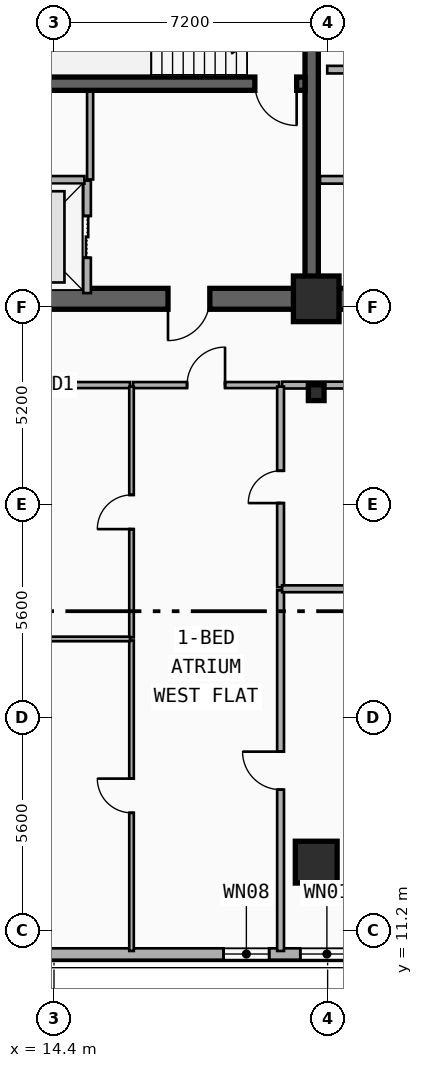
"""IFC4 building model, lengths in metres.
Left out: names, types, materials, properties, quantities, classifications, styles, units other than length and angle.
Written with IfcOpenShell. Run it as: python <this file> out.ifc"""

import sys

from ifc_helpers import new_model, si_unit, direction, frame, frame_2d, origin, origin_2d, place, context, subcontext, project, spatial, rectangle, i_section, extrude, element, fill, save


model = new_model("IFC4")
c1 = context("Model", 3, precision=1e-05, world=origin(), true_north=direction((0.0, 1.0)))
c2 = subcontext(c1, "Body", "Model", "MODEL_VIEW")
j1 = project(units=[si_unit("LENGTHUNIT", "METRE"), si_unit("PLANEANGLEUNIT", "RADIAN")], contexts=[c1])
p1 = place(None, origin())
s1 = spatial("IfcSite", under=j1, at=p1, CompositionType="ELEMENT")
p2 = place(p1, origin())
s2 = spatial("IfcBuilding", under=s1, at=p2, CompositionType="ELEMENT")
p3 = place(p2, frame((0.0, 0.0, 144.8)))
s3 = spatial("IfcBuildingStorey", under=s2, at=p3, CompositionType="ELEMENT", Elevation=144.8)
p4 = place(p3, frame((21.18, 27.82, 0.0), z_axis=(0.0, 0.0, 1.0), x_axis=(-1.0, 0.0, 0.0)))
e1 = element("IfcWall", 1, at=p4, inside=s3, PredefinedType="SHEAR", context=c2, shape_type="SweptSolid", body=[
    extrude(rectangle(XDim=9.03, YDim=0.55, at=frame_2d((4.515, 0.0))), origin(), (0.0, 0.0, 1.0), 3.55),
])
p5 = place(p4, frame((2.68, 0.0, 0.0)))
e2 = element("IfcOpeningElement", 2, at=p5, cuts=e1, PredefinedType="OPENING", context=c2, shape_type="SweptSolid", body=[
    extrude(rectangle(XDim=1.1, YDim=2.15, at=frame_2d((0.55, 1.075))), frame((0.0, 0.285, 0.0), z_axis=(0.0, -1.0, 0.0), x_axis=(1.0, 0.0, 0.0)), (0.0, 0.0, 1.0), 0.57),
])
p6 = place(p3, frame((33.15, 27.82, 0.0), z_axis=(0.0, 0.0, 1.0), x_axis=(-1.0, 0.0, 0.0)))
e3 = element("IfcWall", 3, at=p6, inside=s3, PredefinedType="SHEAR", context=c2, shape_type="SweptSolid", body=[
    extrude(rectangle(XDim=11.97, YDim=0.55, at=frame_2d((5.985, 0.0))), origin(), (0.0, 0.0, 1.0), 3.55),
])
p7 = place(p6, frame((6.1, 0.0, 0.0)))
e4 = element("IfcOpeningElement", 4, at=p7, cuts=e3, PredefinedType="OPENING", context=c2, shape_type="SweptSolid", body=[
    extrude(rectangle(XDim=1.6, YDim=2.2, at=frame_2d((0.8, 1.1))), frame((0.0, 0.285, 0.0), z_axis=(0.0, -1.0, 0.0), x_axis=(1.0, 0.0, 0.0)), (0.0, 0.0, 1.0), 0.57),
])
p8 = place(p3, frame((21.18, 28.095, 0.0), z_axis=(0.0, 0.0, 1.0), x_axis=(0.0, 1.0, 0.0)))
e5 = element("IfcWall", 5, at=p8, inside=s3, PredefinedType="SHEAR", context=c2, shape_type="SweptSolid", body=[
    extrude(rectangle(XDim=8.68, YDim=0.35, at=frame_2d((4.34, 0.0))), origin(), (0.0, 0.0, 1.0), 3.55),
])
p9 = place(p3, frame((21.005, 33.48, 0.0), z_axis=(0.0, 0.0, 1.0), x_axis=(-1.0, 0.0, 0.0)))
e6 = element("IfcWall", 6, at=p9, inside=s3, PredefinedType="SHEAR", context=c2, shape_type="SweptSolid", body=[
    extrude(rectangle(XDim=8.58, YDim=0.35, at=frame_2d((4.29, 0.0))), origin(), (0.0, 0.0, 1.0), 3.55),
])
p10 = place(p9, frame((0.22, 0.0, 0.0)))
e7 = element("IfcOpeningElement", 7, at=p10, cuts=e6, PredefinedType="OPENING", context=c2, shape_type="SweptSolid", body=[
    extrude(rectangle(XDim=1.1, YDim=2.15, at=frame_2d((0.55, 1.075))), frame((0.0, 0.185, 0.0), z_axis=(0.0, -1.0, 0.0), x_axis=(1.0, 0.0, 0.0)), (0.0, 0.0, 1.0), 0.37),
])
p11 = place(p3, frame((21.3, 27.82, 0.0), z_axis=(0.0, 0.0, 1.0), x_axis=(1.0, 0.0, 0.0)))
e8 = element("IfcColumn", 8, at=p11, inside=s3, PredefinedType="COLUMN", context=c2, shape_type="SweptSolid", body=[
    extrude(rectangle(XDim=1.2, YDim=1.2, at=origin_2d()), origin(), (0.0, 0.0, 1.0), 3.55),
])
p12 = place(p3, frame((21.3, 25.35, 0.0), z_axis=(0.0, 0.0, 1.0), x_axis=(1.0, 0.0, 0.0)))
e9 = element("IfcColumn", 9, at=p12, inside=s3, PredefinedType="COLUMN", context=c2, shape_type="SweptSolid", body=[
    extrude(i_section(OverallWidth=0.413, OverallDepth=0.415, WebThickness=0.03, FlangeThickness=0.047, FilletRadius=0.015, at=origin_2d()), origin(), (0.0, 0.0, 1.0), 3.55),
])
p13 = place(p3, frame((21.3, 13.106, 0.0), z_axis=(0.0, -0.0902702026, 0.995917311087), x_axis=(1.0, 0.0, 0.0)))
e10 = element("IfcColumn", 10, at=p13, inside=s3, PredefinedType="COLUMN", context=c2, shape_type="SweptSolid", body=[
    extrude(rectangle(XDim=1.1, YDim=1.1, at=origin_2d()), origin(), (0.0, 0.0, 1.0), 3.565),
])
p14 = place(p3, frame((48.0, 10.58, 0.0), z_axis=(0.0, 0.0, 1.0), x_axis=(-1.0, 0.0, 0.0)))
e11 = element("IfcWall", 11, at=p14, inside=s3, PredefinedType="SOLIDWALL", context=c2, shape_type="SweptSolid", body=[
    extrude(rectangle(XDim=38.4, YDim=0.3, at=frame_2d((19.2, 0.0))), origin(), (0.0, 0.0, 1.0), 3.29),
])
p15 = place(p14, frame((36.19, 0.0, 0.34)))
e12 = element("IfcOpeningElement", 12, at=p15, cuts=e11, PredefinedType="OPENING", context=c2, shape_type="SweptSolid", body=[
    extrude(rectangle(XDim=1.8, YDim=1.8, at=frame_2d((0.9, 0.9))), frame((0.0, 0.16, 0.0), z_axis=(0.0, -1.0, 0.0), x_axis=(1.0, 0.0, 0.0)), (0.0, 0.0, 1.0), 0.32),
])
p16 = place(p14, frame((27.938, 0.0, 0.34)))
e13 = element("IfcOpeningElement", 13, at=p16, cuts=e11, PredefinedType="OPENING", context=c2, shape_type="SweptSolid", body=[
    extrude(rectangle(XDim=1.2, YDim=1.5, at=frame_2d((0.6, 0.75))), frame((0.0, 0.16, 0.0), z_axis=(0.0, -1.0, 0.0), x_axis=(1.0, 0.0, 0.0)), (0.0, 0.0, 1.0), 0.32),
])
p17 = place(p14, frame((25.719, 0.0, 0.34)))
e14 = element("IfcOpeningElement", 14, at=p17, cuts=e11, PredefinedType="OPENING", context=c2, shape_type="SweptSolid", body=[
    extrude(rectangle(XDim=1.4, YDim=1.8, at=frame_2d((0.7, 0.9))), frame((0.0, 0.16, 0.0), z_axis=(0.0, -1.0, 0.0), x_axis=(1.0, 0.0, 0.0)), (0.0, 0.0, 1.0), 0.32),
])
p18 = place(p14, frame((33.861, 0.0, 1.22)))
e15 = element("IfcOpeningElement", 15, at=p18, cuts=e11, PredefinedType="OPENING", context=c2, shape_type="SweptSolid", body=[
    extrude(rectangle(XDim=1.2, YDim=1.5, at=frame_2d((0.6, 0.75))), frame((0.0, 0.16, 0.0), z_axis=(0.0, -1.0, 0.0), x_axis=(1.0, 0.0, 0.0)), (0.0, 0.0, 1.0), 0.32),
])
p19 = place(p14, frame((20.1, 0.0, 0.65)))
e16 = element("IfcOpeningElement", 16, at=p19, cuts=e11, PredefinedType="OPENING", context=c2, shape_type="SweptSolid", body=[
    extrude(rectangle(XDim=2.1, YDim=2.1, at=frame_2d((1.05, 1.05))), frame((0.0, 0.16, 0.0), z_axis=(0.0, -1.0, 0.0), x_axis=(1.0, 0.0, 0.0)), (0.0, 0.0, 1.0), 0.32),
])
p20 = place(p14, frame((22.95, 0.0, 0.8)))
e17 = element("IfcOpeningElement", 17, at=p20, cuts=e11, PredefinedType="OPENING", context=c2, shape_type="SweptSolid", body=[
    extrude(rectangle(XDim=1.8, YDim=1.8, at=frame_2d((0.9, 0.9))), frame((0.0, 0.16, 0.0), z_axis=(0.0, -1.0, 0.0), x_axis=(1.0, 0.0, 0.0)), (0.0, 0.0, 1.0), 0.32),
])
p21 = place(p14, frame((13.35, 0.0, 0.65)))
e18 = element("IfcOpeningElement", 18, at=p21, cuts=e11, PredefinedType="OPENING", context=c2, shape_type="SweptSolid", body=[
    extrude(rectangle(XDim=2.1, YDim=2.1, at=frame_2d((1.05, 1.05))), frame((0.0, 0.16, 0.0), z_axis=(0.0, -1.0, 0.0), x_axis=(1.0, 0.0, 0.0)), (0.0, 0.0, 1.0), 0.32),
])
p22 = place(p14, frame((8.25, 0.0, 1.68)))
e19 = element("IfcOpeningElement", 19, at=p22, cuts=e11, PredefinedType="OPENING", context=c2, shape_type="SweptSolid", body=[
    extrude(rectangle(XDim=1.1, YDim=1.05, at=frame_2d((0.55, 0.525))), frame((0.0, 0.16, 0.0), z_axis=(0.0, -1.0, 0.0), x_axis=(1.0, 0.0, 0.0)), (0.0, 0.0, 1.0), 0.32),
])
p23 = place(p14, frame((2.9, 0.0, 0.34)))
e20 = element("IfcOpeningElement", 20, at=p23, cuts=e11, PredefinedType="OPENING", context=c2, shape_type="SweptSolid", body=[
    extrude(rectangle(XDim=1.4, YDim=1.8, at=frame_2d((0.7, 0.9))), frame((0.0, 0.16, 0.0), z_axis=(0.0, -1.0, 0.0), x_axis=(1.0, 0.0, 0.0)), (0.0, 0.0, 1.0), 0.32),
])
p24 = place(p14, frame((0.41, 0.0, 0.34)))
e21 = element("IfcOpeningElement", 21, at=p24, cuts=e11, PredefinedType="OPENING", context=c2, shape_type="SweptSolid", body=[
    extrude(rectangle(XDim=1.8, YDim=1.8, at=frame_2d((0.9, 0.9))), frame((0.0, 0.16, 0.0), z_axis=(0.0, -1.0, 0.0), x_axis=(1.0, 0.0, 0.0)), (0.0, 0.0, 1.0), 0.32),
])
p25 = place(p3, frame((15.27, 27.97, 0.0), z_axis=(0.0, 0.0, 1.0), x_axis=(0.0, 1.0, 0.0)))
e22 = element("IfcWall", 22, at=p25, inside=s3, PredefinedType="PARTITIONING", context=c2, shape_type="SweptSolid", body=[
    extrude(rectangle(XDim=2.96, YDim=0.2, at=frame_2d((1.48, 0.0))), origin(), (0.0, 0.0, 1.0), 2.36),
])
p26 = place(p25, frame((0.93, 0.0, 0.0)))
e23 = element("IfcOpeningElement", 23, at=p26, cuts=e22, PredefinedType="OPENING", context=c2, shape_type="SweptSolid", body=[
    extrude(rectangle(XDim=1.1, YDim=2.15, at=frame_2d((0.55, 1.075))), frame((0.0, 0.11, 0.0), z_axis=(0.0, -1.0, 0.0), x_axis=(1.0, 0.0, 0.0)), (0.0, 0.0, 1.0), 0.22),
])
p27 = place(p3, frame((12.45, 30.95, 0.0), z_axis=(0.0, 0.0, 1.0), x_axis=(1.0, 0.0, 0.0)))
e24 = element("IfcWall", 24, at=p27, inside=s3, PredefinedType="PARTITIONING", context=c2, shape_type="SweptSolid", body=[
    extrude(rectangle(XDim=2.75, YDim=0.2, at=frame_2d((1.375, 0.0))), origin(), (0.0, 0.0, 1.0), 2.36),
])
p28 = place(p3, frame((21.4, 30.95, 0.0), z_axis=(0.0, 0.0, 1.0), x_axis=(1.0, 0.0, 0.0)))
e25 = element("IfcWall", 25, at=p28, inside=s3, PredefinedType="PARTITIONING", context=c2, shape_type="SweptSolid", body=[
    extrude(rectangle(XDim=3.46, YDim=0.2, at=frame_2d((1.73, 0.0))), origin(), (0.0, 0.0, 1.0), 2.36),
])
p29 = place(p28, frame((1.13, 0.0, 0.0)))
e26 = element("IfcOpeningElement", 26, at=p29, cuts=e25, PredefinedType="OPENING", context=c2, shape_type="SweptSolid", body=[
    extrude(rectangle(XDim=1.2, YDim=2.15, at=frame_2d((0.6, 1.075))), frame((0.0, 0.11, 0.0), z_axis=(0.0, -1.0, 0.0), x_axis=(1.0, 0.0, 0.0)), (0.0, 0.0, 1.0), 0.22),
])
p30 = place(p3, frame((21.59, 33.85, 0.0), z_axis=(0.0, 0.0, 1.0), x_axis=(1.0, 0.0, 0.0)))
e27 = element("IfcWall", 27, at=p30, inside=s3, PredefinedType="PARTITIONING", context=c2, shape_type="SweptSolid", body=[
    extrude(rectangle(XDim=5.92, YDim=0.2, at=frame_2d((2.96, 0.0))), origin(), (0.0, 0.0, 1.0), 2.36),
])
p31 = place(p30, frame((2.36, 0.0, 0.0)))
e28 = element("IfcOpeningElement", 28, at=p31, cuts=e27, PredefinedType="OPENING", context=c2, shape_type="SweptSolid", body=[
    extrude(rectangle(XDim=1.2, YDim=2.15, at=frame_2d((0.6, 1.075))), frame((0.0, 0.11, 0.0), z_axis=(0.0, -1.0, 0.0), x_axis=(1.0, 0.0, 0.0)), (0.0, 0.0, 1.0), 0.22),
])
p32 = place(p3, frame((16.48, 25.55, 0.0), z_axis=(0.0, 0.0, 1.0), x_axis=(1.0, 0.0, 0.0)))
e29 = element("IfcWall", 29, at=p32, inside=s3, PredefinedType="PARTITIONING", context=c2, shape_type="SweptSolid", body=[
    extrude(rectangle(XDim=3.842, YDim=0.16, at=frame_2d((1.921, 0.0))), origin(), (0.0, 0.0, 1.0), 3.29),
])
p33 = place(p32, frame((1.421, 0.0, 0.0)))
e30 = element("IfcOpeningElement", 30, at=p33, cuts=e29, PredefinedType="OPENING", context=c2, shape_type="SweptSolid", body=[
    extrude(rectangle(XDim=1.0, YDim=2.15, at=frame_2d((0.5, 1.075))), frame((0.0, 0.09, 0.0), z_axis=(0.0, -1.0, 0.0), x_axis=(1.0, 0.0, 0.0)), (0.0, 0.0, 1.0), 0.18),
])
p34 = place(p3, frame((20.402, 25.55, 0.0), z_axis=(0.0, 0.0, 1.0), x_axis=(1.0, 0.0, 0.0)))
e31 = element("IfcWall", 31, at=p34, inside=s3, PredefinedType="PLUMBINGWALL", context=c2, shape_type="SweptSolid", body=[
    extrude(rectangle(XDim=2.358, YDim=0.18, at=frame_2d((1.179, 0.0))), origin(), (0.0, 0.0, 1.0), 2.36),
])
p35 = place(p3, frame((12.24, 25.55, 0.0), z_axis=(0.0, 0.0, 1.0), x_axis=(1.0, 0.0, 0.0)))
e32 = element("IfcWall", 32, at=p35, inside=s3, PredefinedType="PARTITIONING", context=c2, shape_type="SweptSolid", body=[
    extrude(rectangle(XDim=4.16, YDim=0.16, at=frame_2d((2.08, 0.0))), origin(), (0.0, 0.0, 1.0), 2.36),
])
p36 = place(p3, frame((20.362, 10.66, 0.0), z_axis=(0.0, 0.0, 1.0), x_axis=(0.0, 1.0, 0.0)))
e33 = element("IfcWall", 33, at=p36, inside=s3, PredefinedType="PLUMBINGWALL", context=c2, shape_type="SweptSolid", body=[
    extrude(rectangle(XDim=9.49, YDim=0.18, at=frame_2d((4.745, 0.0))), origin(), (0.0, 0.0, 1.0), 2.72),
])
p37 = place(p36, frame((4.245, 0.0, 0.0)))
e34 = element("IfcOpeningElement", 34, at=p37, cuts=e33, PredefinedType="OPENING", context=c2, shape_type="SweptSolid", body=[
    extrude(rectangle(XDim=1.0, YDim=2.15, at=frame_2d((0.5, 1.075))), frame((0.0, 0.1, 0.0), z_axis=(0.0, -1.0, 0.0), x_axis=(1.0, 0.0, 0.0)), (0.0, 0.0, 1.0), 0.2),
])
p38 = place(p3, frame((20.362, 20.23, 0.0), z_axis=(0.0, 0.0, 1.0), x_axis=(0.0, 1.0, 0.0)))
e35 = element("IfcWall", 35, at=p38, inside=s3, PredefinedType="PLUMBINGWALL", context=c2, shape_type="SweptSolid", body=[
    extrude(rectangle(XDim=5.28, YDim=0.18, at=frame_2d((2.64, 0.0))), origin(), (0.0, 0.0, 1.0), 2.72),
])
p39 = place(p38, frame((2.215, 0.0, 0.0)))
e36 = element("IfcOpeningElement", 36, at=p39, cuts=e35, PredefinedType="OPENING", context=c2, shape_type="SweptSolid", body=[
    extrude(rectangle(XDim=0.85, YDim=2.1, at=frame_2d((0.425, 1.05))), frame((0.0, 0.1, 0.0), z_axis=(0.0, -1.0, 0.0), x_axis=(1.0, 0.0, 0.0)), (0.0, 0.0, 1.0), 0.2),
])
p40 = place(p3, frame((16.44, 10.66, 0.0), z_axis=(0.0, 0.0, 1.0), x_axis=(0.0, 1.0, 0.0)))
e37 = element("IfcWall", 37, at=p40, inside=s3, PredefinedType="PARTITIONING", context=c2, shape_type="SweptSolid", body=[
    extrude(rectangle(XDim=8.17, YDim=0.12, at=frame_2d((4.085, 0.0))), origin(), (0.0, 0.0, 1.0), 2.88),
])
p41 = place(p40, frame((3.635, 0.0, 0.0)))
e38 = element("IfcOpeningElement", 38, at=p41, cuts=e37, PredefinedType="OPENING", context=c2, shape_type="SweptSolid", body=[
    extrude(rectangle(XDim=0.9, YDim=2.1, at=frame_2d((0.45, 1.05))), frame((0.0, 0.07, 0.0), z_axis=(0.0, -1.0, 0.0), x_axis=(1.0, 0.0, 0.0)), (0.0, 0.0, 1.0), 0.14),
])
p42 = place(p3, frame((16.44, 18.91, 0.0), z_axis=(0.0, 0.0, 1.0), x_axis=(0.0, 1.0, 0.0)))
e39 = element("IfcWall", 39, at=p42, inside=s3, PredefinedType="PARTITIONING", context=c2, shape_type="SweptSolid", body=[
    extrude(rectangle(XDim=6.6, YDim=0.12, at=frame_2d((3.3, 0.0))), origin(), (0.0, 0.0, 1.0), 2.72),
])
p43 = place(p42, frame((2.85, 0.0, 0.0)))
e40 = element("IfcOpeningElement", 40, at=p43, cuts=e39, PredefinedType="OPENING", context=c2, shape_type="SweptSolid", body=[
    extrude(rectangle(XDim=0.9, YDim=2.1, at=frame_2d((0.45, 1.05))), frame((0.0, 0.07, 0.0), z_axis=(0.0, -1.0, 0.0), x_axis=(1.0, 0.0, 0.0)), (0.0, 0.0, 1.0), 0.14),
])
p44 = place(p3, frame((20.402, 20.19, 0.0), z_axis=(0.0, 0.0, 1.0), x_axis=(1.0, 0.0, 0.0)))
e41 = element("IfcWall", 41, at=p44, inside=s3, PredefinedType="PLUMBINGWALL", context=c2, shape_type="SweptSolid", body=[
    extrude(rectangle(XDim=2.358, YDim=0.18, at=frame_2d((1.179, 0.0))), origin(), (0.0, 0.0, 1.0), 2.36),
])
p45 = place(p3, frame((12.24, 18.87, 0.0), z_axis=(0.0, 0.0, 1.0), x_axis=(1.0, 0.0, 0.0)))
e42 = element("IfcWall", 42, at=p45, inside=s3, PredefinedType="PARTITIONING", context=c2, shape_type="SweptSolid", body=[
    extrude(rectangle(XDim=4.16, YDim=0.12, at=frame_2d((2.08, 0.0))), origin(), (0.0, 0.0, 1.0), 2.36),
])
p46 = place(p3, frame((15.35, 30.96, 0.0), z_axis=(0.0, 0.0, 1.0), x_axis=(0.0, 1.0, 0.0)))
e43 = element("IfcWall", 43, at=p46, inside=s3, PredefinedType="PARTITIONING", context=c2, shape_type="SweptSolid", body=[
    extrude(rectangle(XDim=2.31, YDim=0.16, at=frame_2d((1.155, 0.0))), origin(), (0.0, 0.0, 1.0), 3.29),
])
p47 = place(p16, origin())
e44 = element("IfcWindow", 44, at=p47, inside=s3, PartitioningType="SINGLE_PANEL", PredefinedType="WINDOW", context=c2, shape_type="SweptSolid", body=[
    extrude(rectangle(XDim=1.2, YDim=1.5, at=frame_2d((0.6, 0.75))), frame((0.0, 0.03, 0.0), z_axis=(0.0, -1.0, 0.0), x_axis=(1.0, 0.0, 0.0)), (0.0, 0.0, 1.0), 0.06),
])
fill(e13, e44)
p48 = place(p17, origin())
e45 = element("IfcWindow", 45, at=p48, inside=s3, PartitioningType="SINGLE_PANEL", PredefinedType="WINDOW", context=c2, shape_type="SweptSolid", body=[
    extrude(rectangle(XDim=1.4, YDim=1.8, at=frame_2d((0.7, 0.9))), frame((0.0, 0.03, 0.0), z_axis=(0.0, -1.0, 0.0), x_axis=(1.0, 0.0, 0.0)), (0.0, 0.0, 1.0), 0.06),
])
fill(e14, e45)
p49 = place(p26, origin())
e46 = element("IfcDoor", 46, at=p49, inside=s3, OperationType="DOUBLE_DOOR_SLIDING", PredefinedType="DOOR", context=c2, shape_type="SweptSolid", body=[
    extrude(rectangle(XDim=1.1, YDim=2.15, at=frame_2d((0.55, 1.075))), frame((0.0, 0.025, 0.0), z_axis=(0.0, -1.0, 0.0), x_axis=(1.0, 0.0, 0.0)), (0.0, 0.0, 1.0), 0.05),
])
fill(e23, e46)
p50 = place(p10, origin())
e47 = element("IfcDoor", 47, at=p50, inside=s3, OperationType="SINGLE_SWING_LEFT", PredefinedType="DOOR", context=c2, shape_type="SweptSolid", body=[
    extrude(rectangle(XDim=1.1, YDim=2.15, at=frame_2d((0.55, 1.075))), frame((0.0, 0.025, 0.0), z_axis=(0.0, -1.0, 0.0), x_axis=(1.0, 0.0, 0.0)), (0.0, 0.0, 1.0), 0.05),
])
fill(e7, e47)
p51 = place(p5, origin())
e48 = element("IfcDoor", 48, at=p51, inside=s3, OperationType="SINGLE_SWING_RIGHT", PredefinedType="DOOR", context=c2, shape_type="SweptSolid", body=[
    extrude(rectangle(XDim=1.1, YDim=2.15, at=frame_2d((0.55, 1.075))), frame((0.0, 0.025, 0.0), z_axis=(0.0, -1.0, 0.0), x_axis=(1.0, 0.0, 0.0)), (0.0, 0.0, 1.0), 0.05),
])
fill(e2, e48)
p52 = place(p33, origin())
e49 = element("IfcDoor", 49, at=p52, inside=s3, OperationType="SINGLE_SWING_RIGHT", PredefinedType="DOOR", context=c2, shape_type="SweptSolid", body=[
    extrude(rectangle(XDim=1.0, YDim=2.15, at=frame_2d((0.5, 1.075))), frame((0.0, 0.025, 0.0), z_axis=(0.0, -1.0, 0.0), x_axis=(1.0, 0.0, 0.0)), (0.0, 0.0, 1.0), 0.05),
])
fill(e30, e49)
p53 = place(p37, origin())
e50 = element("IfcDoor", 50, at=p53, inside=s3, OperationType="SINGLE_SWING_RIGHT", PredefinedType="DOOR", context=c2, shape_type="SweptSolid", body=[
    extrude(rectangle(XDim=1.0, YDim=2.15, at=frame_2d((0.5, 1.075))), frame((0.0, 0.025, 0.0), z_axis=(0.0, -1.0, 0.0), x_axis=(1.0, 0.0, 0.0)), (0.0, 0.0, 1.0), 0.05),
])
fill(e34, e50)
p54 = place(p39, origin())
e51 = element("IfcDoor", 51, at=p54, inside=s3, OperationType="SINGLE_SWING_LEFT", PredefinedType="DOOR", context=c2, shape_type="SweptSolid", body=[
    extrude(rectangle(XDim=0.85, YDim=2.1, at=frame_2d((0.425, 1.05))), frame((0.0, 0.025, 0.0), z_axis=(0.0, -1.0, 0.0), x_axis=(1.0, 0.0, 0.0)), (0.0, 0.0, 1.0), 0.05),
])
fill(e36, e51)
p55 = place(p41, origin())
e52 = element("IfcDoor", 52, at=p55, inside=s3, OperationType="SINGLE_SWING_RIGHT", PredefinedType="DOOR", context=c2, shape_type="SweptSolid", body=[
    extrude(rectangle(XDim=0.9, YDim=2.1, at=frame_2d((0.45, 1.05))), frame((0.0, 0.025, 0.0), z_axis=(0.0, -1.0, 0.0), x_axis=(1.0, 0.0, 0.0)), (0.0, 0.0, 1.0), 0.05),
])
fill(e38, e52)
p56 = place(p43, origin())
e53 = element("IfcDoor", 53, at=p56, inside=s3, OperationType="SINGLE_SWING_LEFT", PredefinedType="DOOR", context=c2, shape_type="SweptSolid", body=[
    extrude(rectangle(XDim=0.9, YDim=2.1, at=frame_2d((0.45, 1.05))), frame((0.0, 0.025, 0.0), z_axis=(0.0, -1.0, 0.0), x_axis=(1.0, 0.0, 0.0)), (0.0, 0.0, 1.0), 0.05),
])
fill(e40, e53)
save(model, sys.argv[1])
